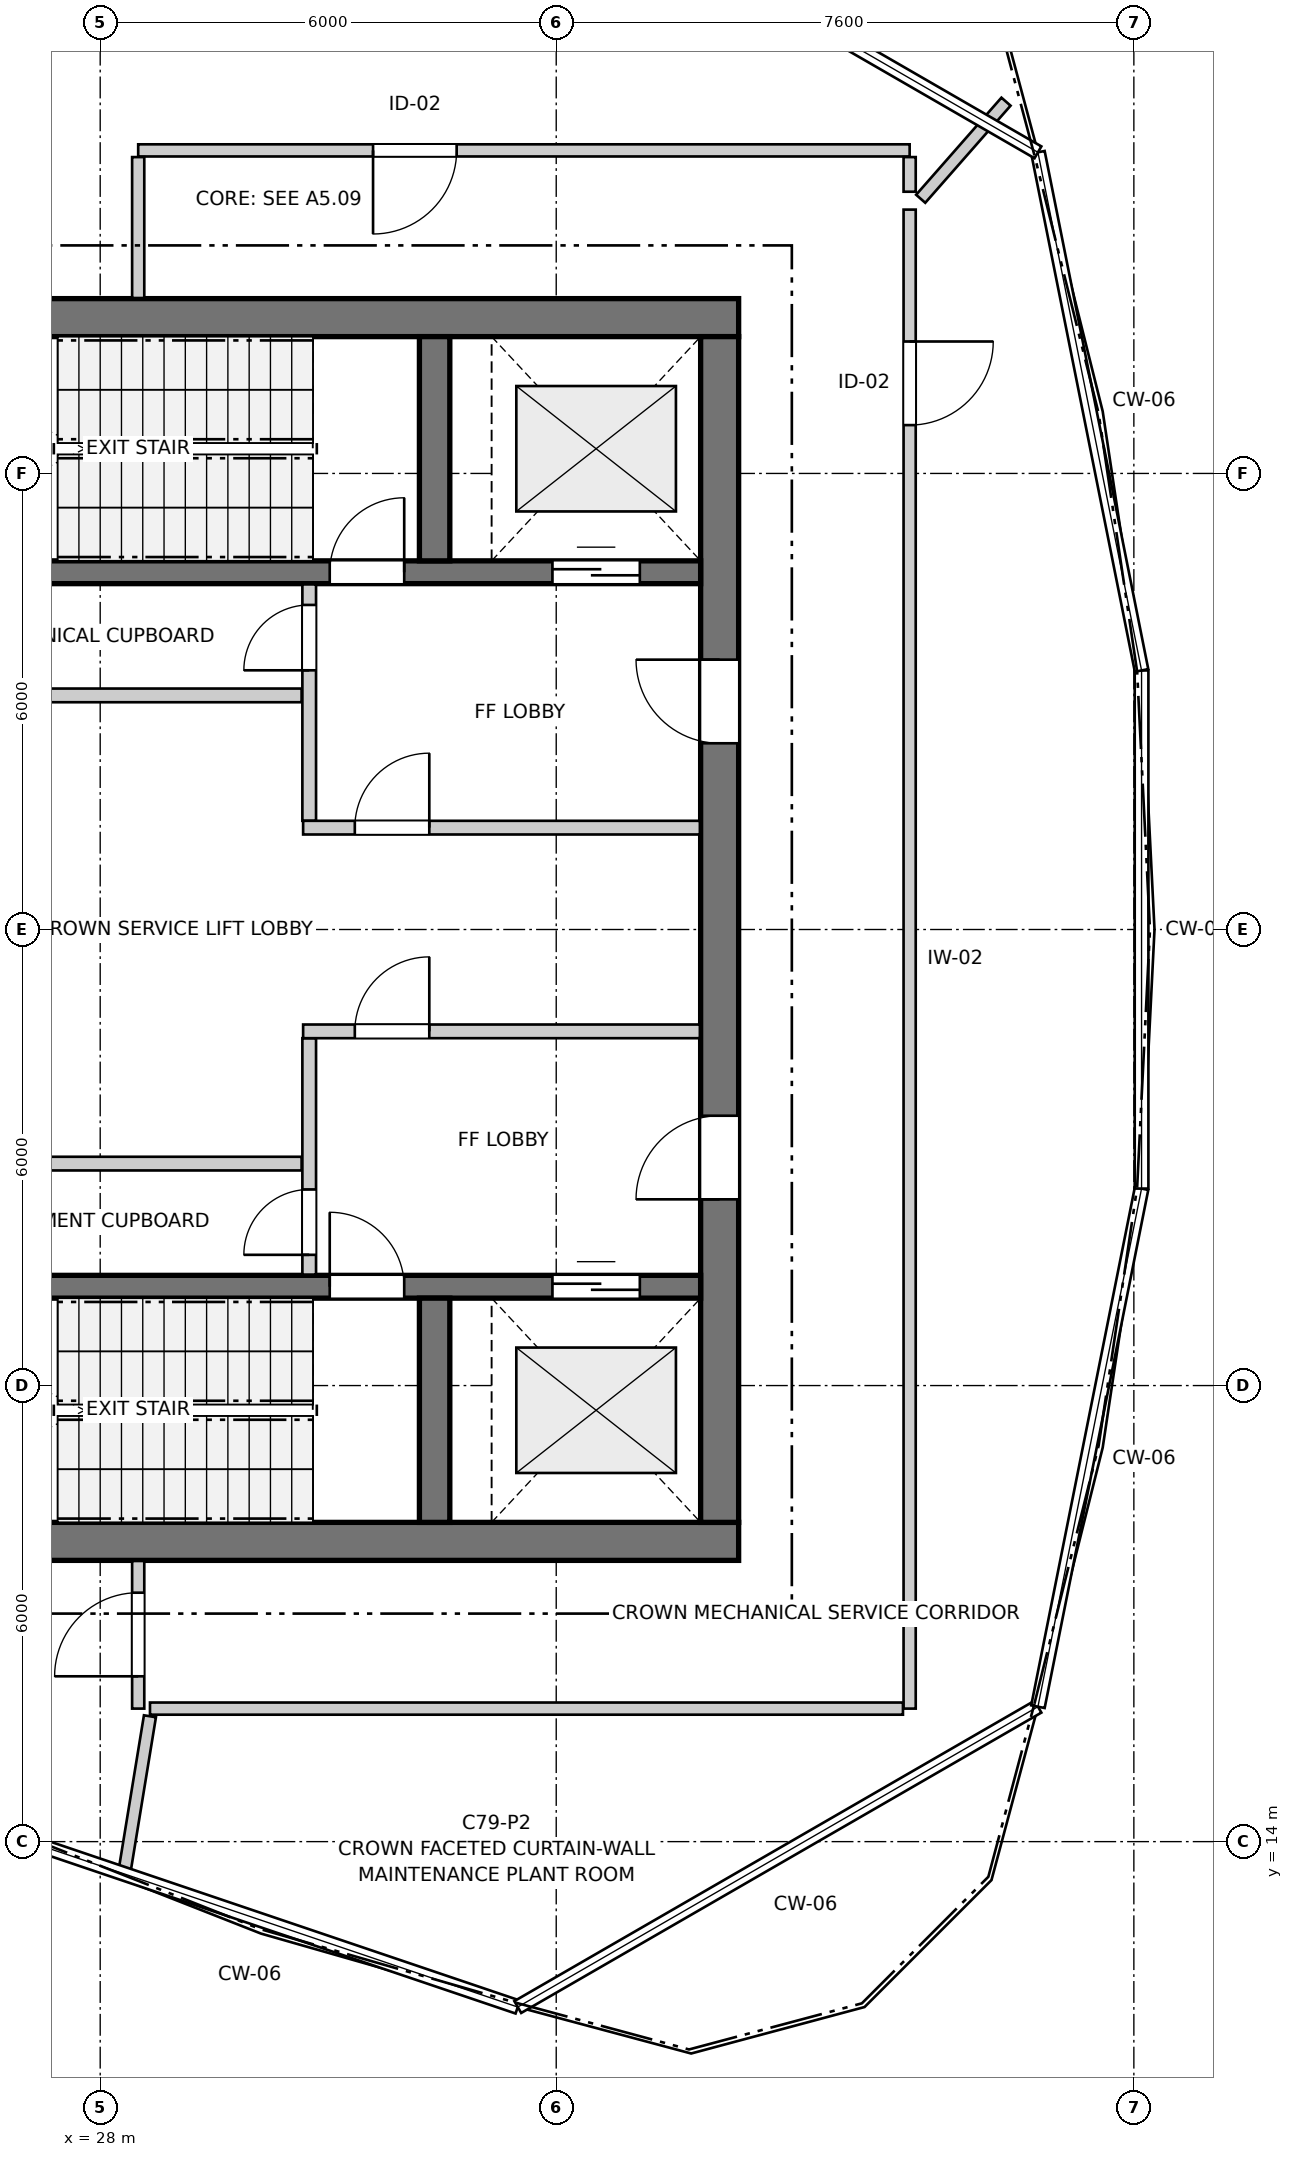
"""IFC4 building model, lengths in metres.
Left out: names, types, materials, properties, quantities, classifications, styles, units other than length and angle.
Written with IfcOpenShell. Run it as: python <this file> out.ifc"""

import sys

from ifc_helpers import new_model, si_unit, direction, frame, frame_2d, origin, place, context, subcontext, project, spatial, rectangle, extrude, source, transform, mapped, element, fill, save


model = new_model("IFC4")
c1 = context("Model", 3, precision=1e-05, world=origin(), true_north=direction((0.0, 1.0)))
c2 = subcontext(c1, "Body", "Model", "MODEL_VIEW")
j1 = project(units=[si_unit("LENGTHUNIT", "METRE"), si_unit("PLANEANGLEUNIT", "RADIAN")], contexts=[c1])
p1 = place(None, origin())
s1 = spatial("IfcSite", under=j1, at=p1, CompositionType="ELEMENT")
p2 = place(p1, origin())
s2 = spatial("IfcBuilding", under=s1, at=p2, CompositionType="ELEMENT")
p3 = place(p2, frame((0.0, 0.0, 266.1)))
s3 = spatial("IfcBuildingStorey", under=s2, at=p3, CompositionType="ELEMENT", Elevation=266.1)
for number, where, z_axis, x_axis in (
    (1, (24.3, 17.95, 0.0), (0.0, 0.0, 1.0), (1.0, 0.0, 0.0)),
    (2, (36.4, 34.05, 0.0), (0.0, 0.0, 1.0), (-1.0, 0.0, 0.0)),
):
    element("IfcWall", number, at=place(p3, frame(where, z_axis=z_axis, x_axis=x_axis)), inside=s3, PredefinedType="SHEAR", context=c2, shape_type="SweptSolid", body=[
        extrude(rectangle(XDim=12.1, YDim=0.5, at=frame_2d((6.05, 0.0))), origin(), (0.0, 0.0, 1.0), 4.05),
    ])
p4 = place(p3, frame((36.15, 18.2, 0.0), z_axis=(0.0, 0.0, 1.0), x_axis=(0.0, 1.0, 0.0)))
e3 = element("IfcWall", 3, at=p4, inside=s3, PredefinedType="SHEAR", context=c2, shape_type="SweptSolid", body=[
    extrude(rectangle(XDim=15.6, YDim=0.5, at=frame_2d((7.8, 0.0))), origin(), (0.0, 0.0, 1.0), 4.05),
])
p5 = place(p4, frame((4.25, 0.0, 0.0)))
e4 = element("IfcOpeningElement", 4, at=p5, cuts=e3, PredefinedType="OPENING", context=c2, shape_type="SweptSolid", body=[
    extrude(rectangle(XDim=1.1, YDim=2.15, at=frame_2d((0.55, 1.075))), frame((0.0, 0.26, 0.0), z_axis=(0.0, -1.0, 0.0), x_axis=(1.0, 0.0, 0.0)), (0.0, 0.0, 1.0), 0.52),
])
p6 = place(p4, frame((10.25, 0.0, 0.0)))
e5 = element("IfcOpeningElement", 5, at=p6, cuts=e3, PredefinedType="OPENING", context=c2, shape_type="SweptSolid", body=[
    extrude(rectangle(XDim=1.1, YDim=2.15, at=frame_2d((0.55, 1.075))), frame((0.0, 0.26, 0.0), z_axis=(0.0, -1.0, 0.0), x_axis=(1.0, 0.0, 0.0)), (0.0, 0.0, 1.0), 0.52),
])
p7 = place(p3, frame((24.8, 21.3, 0.0), z_axis=(0.0, 0.0, 1.0), x_axis=(1.0, 0.0, 0.0)))
e6 = element("IfcWall", 6, at=p7, inside=s3, PredefinedType="SHEAR", context=c2, shape_type="SweptSolid", body=[
    extrude(rectangle(XDim=11.1, YDim=0.3, at=frame_2d((5.55, 0.0))), origin(), (0.0, 0.0, 1.0), 4.05),
])
p8 = place(p7, frame((6.22, 0.0, 0.0)))
e7 = element("IfcOpeningElement", 7, at=p8, cuts=e6, PredefinedType="OPENING", context=c2, shape_type="SweptSolid", body=[
    extrude(rectangle(XDim=0.98, YDim=2.15, at=frame_2d((0.49, 1.075))), frame((0.0, 0.16, 0.0), z_axis=(0.0, -1.0, 0.0), x_axis=(1.0, 0.0, 0.0)), (0.0, 0.0, 1.0), 0.32),
])
p9 = place(p7, frame((9.15, 0.0, 0.0)))
e8 = element("IfcOpeningElement", 8, at=p9, cuts=e6, PredefinedType="OPENING", context=c2, shape_type="SweptSolid", body=[
    extrude(rectangle(XDim=1.15, YDim=2.15, at=frame_2d((0.575, 1.075))), frame((0.0, 0.16, 0.0), z_axis=(0.0, -1.0, 0.0), x_axis=(1.0, 0.0, 0.0)), (0.0, 0.0, 1.0), 0.32),
])
p10 = place(p3, frame((32.4, 18.2, 0.0), z_axis=(0.0, 0.0, 1.0), x_axis=(0.0, 1.0, 0.0)))
e9 = element("IfcWall", 9, at=p10, inside=s3, PredefinedType="SHEAR", context=c2, shape_type="SweptSolid", body=[
    extrude(rectangle(XDim=2.95, YDim=0.4, at=frame_2d((1.475, 0.0))), origin(), (0.0, 0.0, 1.0), 4.05),
])
p11 = place(p3, frame((24.8, 30.7, 0.0), z_axis=(0.0, 0.0, 1.0), x_axis=(1.0, 0.0, 0.0)))
e10 = element("IfcWall", 10, at=p11, inside=s3, PredefinedType="SHEAR", context=c2, shape_type="SweptSolid", body=[
    extrude(rectangle(XDim=11.1, YDim=0.3, at=frame_2d((5.55, 0.0))), origin(), (0.0, 0.0, 1.0), 4.05),
])
p12 = place(p11, frame((6.22, 0.0, 0.0)))
e11 = element("IfcOpeningElement", 11, at=p12, cuts=e10, PredefinedType="OPENING", context=c2, shape_type="SweptSolid", body=[
    extrude(rectangle(XDim=0.98, YDim=2.15, at=frame_2d((0.49, 1.075))), frame((0.0, 0.16, 0.0), z_axis=(0.0, -1.0, 0.0), x_axis=(1.0, 0.0, 0.0)), (0.0, 0.0, 1.0), 0.32),
])
p13 = place(p11, frame((9.15, 0.0, 0.0)))
e12 = element("IfcOpeningElement", 12, at=p13, cuts=e10, PredefinedType="OPENING", context=c2, shape_type="SweptSolid", body=[
    extrude(rectangle(XDim=1.15, YDim=2.15, at=frame_2d((0.575, 1.075))), frame((0.0, 0.16, 0.0), z_axis=(0.0, -1.0, 0.0), x_axis=(1.0, 0.0, 0.0)), (0.0, 0.0, 1.0), 0.32),
])
p14 = place(p3, frame((32.4, 30.85, 0.0), z_axis=(0.0, 0.0, 1.0), x_axis=(0.0, 1.0, 0.0)))
e13 = element("IfcWall", 13, at=p14, inside=s3, PredefinedType="SHEAR", context=c2, shape_type="SweptSolid", body=[
    extrude(rectangle(XDim=2.95, YDim=0.4, at=frame_2d((1.475, 0.0))), origin(), (0.0, 0.0, 1.0), 4.05),
])
p15 = place(p3, frame((30.75, 21.46, 0.0), z_axis=(0.0, 0.0, 1.0), x_axis=(0.0, 1.0, 0.0)))
e14 = element("IfcWall", 14, at=p15, inside=s3, PredefinedType="PARTITIONING", context=c2, shape_type="SweptSolid", body=[
    extrude(rectangle(XDim=3.11, YDim=0.18, at=frame_2d((1.555, 0.0))), origin(), (0.0, 0.0, 1.0), 4.05),
])
p16 = place(p15, frame((0.26, 0.0, 0.0)))
e15 = element("IfcOpeningElement", 15, at=p16, cuts=e14, PredefinedType="OPENING", context=c2, shape_type="SweptSolid", body=[
    extrude(rectangle(XDim=0.86, YDim=2.05, at=frame_2d((0.43, 1.025))), frame((0.0, 0.1, 0.0), z_axis=(0.0, -1.0, 0.0), x_axis=(1.0, 0.0, 0.0)), (0.0, 0.0, 1.0), 0.2),
])
p17 = place(p3, frame((30.67, 24.66, 0.0), z_axis=(0.0, 0.0, 1.0), x_axis=(1.0, 0.0, 0.0)))
e16 = element("IfcWall", 16, at=p17, inside=s3, PredefinedType="PARTITIONING", context=c2, shape_type="SweptSolid", body=[
    extrude(rectangle(XDim=5.22, YDim=0.18, at=frame_2d((2.61, 0.0))), origin(), (0.0, 0.0, 1.0), 4.05),
])
p18 = place(p17, frame((0.68, 0.0, 0.0)))
e17 = element("IfcOpeningElement", 17, at=p18, cuts=e16, PredefinedType="OPENING", context=c2, shape_type="SweptSolid", body=[
    extrude(rectangle(XDim=0.98, YDim=2.15, at=frame_2d((0.49, 1.075))), frame((0.0, 0.1, 0.0), z_axis=(0.0, -1.0, 0.0), x_axis=(1.0, 0.0, 0.0)), (0.0, 0.0, 1.0), 0.2),
])
p19 = place(p3, frame((30.75, 27.43, 0.0), z_axis=(0.0, 0.0, 1.0), x_axis=(0.0, 1.0, 0.0)))
e18 = element("IfcWall", 18, at=p19, inside=s3, PredefinedType="PARTITIONING", context=c2, shape_type="SweptSolid", body=[
    extrude(rectangle(XDim=3.11, YDim=0.18, at=frame_2d((1.555, 0.0))), origin(), (0.0, 0.0, 1.0), 4.05),
])
p20 = place(p19, frame((1.98, 0.0, 0.0)))
e19 = element("IfcOpeningElement", 19, at=p20, cuts=e18, PredefinedType="OPENING", context=c2, shape_type="SweptSolid", body=[
    extrude(rectangle(XDim=0.86, YDim=2.05, at=frame_2d((0.43, 1.025))), frame((0.0, 0.1, 0.0), z_axis=(0.0, -1.0, 0.0), x_axis=(1.0, 0.0, 0.0)), (0.0, 0.0, 1.0), 0.2),
])
p21 = place(p3, frame((30.67, 27.34, 0.0), z_axis=(0.0, 0.0, 1.0), x_axis=(1.0, 0.0, 0.0)))
e20 = element("IfcWall", 20, at=p21, inside=s3, PredefinedType="PARTITIONING", context=c2, shape_type="SweptSolid", body=[
    extrude(rectangle(XDim=5.22, YDim=0.18, at=frame_2d((2.61, 0.0))), origin(), (0.0, 0.0, 1.0), 4.05),
])
p22 = place(p21, frame((0.68, 0.0, 0.0)))
e21 = element("IfcOpeningElement", 21, at=p22, cuts=e20, PredefinedType="OPENING", context=c2, shape_type="SweptSolid", body=[
    extrude(rectangle(XDim=0.98, YDim=2.15, at=frame_2d((0.49, 1.075))), frame((0.0, 0.1, 0.0), z_axis=(0.0, -1.0, 0.0), x_axis=(1.0, 0.0, 0.0)), (0.0, 0.0, 1.0), 0.2),
])
for number, where, z_axis, x_axis in (
    (22, (24.81, 22.92, 0.0), (0.0, 0.0, 1.0), (1.0, 0.0, 0.0)),
    (23, (24.81, 29.08, 0.0), (0.0, 0.0, 1.0), (1.0, 0.0, 0.0)),
):
    element("IfcWall", number, at=place(p3, frame(where, z_axis=z_axis, x_axis=x_axis)), inside=s3, PredefinedType="PARTITIONING", context=c2, shape_type="SweptSolid", body=[
        extrude(rectangle(XDim=5.84, YDim=0.18, at=frame_2d((2.92, 0.0))), origin(), (0.0, 0.0, 1.0), 4.05),
    ])
p23 = place(p3, frame((38.65, 35.471, 0.0), z_axis=(0.0, 0.0, 1.0), x_axis=(0.0, -1.0, 0.0)))
e24 = element("IfcWall", 24, at=p23, inside=s3, PredefinedType="PARTITIONING", context=c2, shape_type="SweptSolid", body=[
    extrude(rectangle(XDim=19.721, YDim=0.16, at=frame_2d((9.86, 0.0))), origin(), (0.0, 0.0, 1.0), 4.05),
])
p24 = place(p23, frame((1.735, 0.0, 0.0)))
e25 = element("IfcOpeningElement", 25, at=p24, cuts=e24, PredefinedType="OPENING", context=c2, shape_type="SweptSolid", body=[
    extrude(rectangle(XDim=1.1, YDim=2.15, at=frame_2d((0.55, 1.075))), frame((0.0, 0.09, 0.0), z_axis=(0.0, -1.0, 0.0), x_axis=(1.0, 0.0, 0.0)), (0.0, 0.0, 1.0), 0.18),
])
p25 = place(p3, frame((38.65, 36.25, 0.0), z_axis=(0.0, 0.0, 1.0), x_axis=(-1.0, 0.0, 0.0)))
e26 = element("IfcWall", 26, at=p25, inside=s3, PredefinedType="PARTITIONING", context=c2, shape_type="SweptSolid", body=[
    extrude(rectangle(XDim=10.15, YDim=0.16, at=frame_2d((5.075, 0.0))), origin(), (0.0, 0.0, 1.0), 4.05),
])
p26 = place(p25, frame((5.96, 0.0, 0.0)))
e27 = element("IfcOpeningElement", 27, at=p26, cuts=e26, PredefinedType="OPENING", context=c2, shape_type="SweptSolid", body=[
    extrude(rectangle(XDim=1.1, YDim=2.15, at=frame_2d((0.55, 1.075))), frame((0.0, 0.09, 0.0), z_axis=(0.0, -1.0, 0.0), x_axis=(1.0, 0.0, 0.0)), (0.0, 0.0, 1.0), 0.18),
])
p27 = place(p3, frame((28.5, 15.75, 0.0), z_axis=(0.0, 0.0, 1.0), x_axis=(0.0, 1.0, 0.0)))
e28 = element("IfcWall", 28, at=p27, inside=s3, PredefinedType="PARTITIONING", context=c2, shape_type="SweptSolid", body=[
    extrude(rectangle(XDim=1.942, YDim=0.16, at=frame_2d((0.971, 0.0))), origin(), (0.0, 0.0, 1.0), 3.318),
])
p28 = place(p27, frame((0.425, 0.0, 0.0)))
e29 = element("IfcOpeningElement", 29, at=p28, cuts=e28, PredefinedType="OPENING", context=c2, shape_type="SweptSolid", body=[
    extrude(rectangle(XDim=1.1, YDim=2.15, at=frame_2d((0.55, 1.075))), frame((0.0, 0.09, 0.0), z_axis=(0.0, -1.0, 0.0), x_axis=(1.0, 0.0, 0.0)), (0.0, 0.0, 1.0), 0.18),
])
p29 = place(p3, frame((28.655, 15.75, 0.0), z_axis=(0.0, 0.0, 1.0), x_axis=(1.0, 0.0, 0.0)))
e30 = element("IfcWall", 30, at=p29, inside=s3, PredefinedType="PARTITIONING", context=c2, shape_type="SweptSolid", body=[
    extrude(rectangle(XDim=9.907, YDim=0.16, at=frame_2d((4.954, 0.0))), origin(), (0.0, 0.0, 1.0), 4.05),
])
p30 = place(p3, frame((28.319, 13.603, 0.0), z_axis=(0.0, 0.0, 1.0), x_axis=(0.161630316239, 0.986851377297, 0.0)))
e31 = element("IfcWall", 31, at=p30, inside=s3, PredefinedType="PARTITIONING", context=c2, shape_type="SweptSolid", body=[
    extrude(rectangle(XDim=2.074, YDim=0.16, at=frame_2d((1.037, 0.0))), origin(), (0.0, 0.0, 1.0), 4.05),
])
p31 = place(p3, frame((28.5, 34.308, 0.0), z_axis=(0.0, 0.0, 1.0), x_axis=(0.0, 1.0, 0.0)))
e32 = element("IfcWall", 32, at=p31, inside=s3, PredefinedType="PARTITIONING", context=c2, shape_type="SweptSolid", body=[
    extrude(rectangle(XDim=1.854, YDim=0.16, at=frame_2d((0.927, 0.0))), origin(), (0.0, 0.0, 1.0), 3.318),
])
p32 = place(p3, frame((38.795, 35.614, 0.0), z_axis=(0.0, 0.0, 1.0), x_axis=(0.659905949222, 0.751348213667, 0.0)))
e33 = element("IfcWall", 33, at=p32, inside=s3, PredefinedType="PARTITIONING", context=c2, shape_type="SweptSolid", body=[
    extrude(rectangle(XDim=1.701, YDim=0.16, at=frame_2d((0.85, 0.0))), origin(), (0.0, 0.0, 1.0), 4.05),
])
p33 = place(p3, frame((38.65, 35.706, 0.0), z_axis=(0.0, 0.0, 1.0), x_axis=(0.0, 1.0, 0.0)))
e34 = element("IfcWall", 34, at=p33, inside=s3, PredefinedType="PARTITIONING", context=c2, shape_type="SweptSolid", body=[
    extrude(rectangle(XDim=0.456, YDim=0.16, at=frame_2d((0.228, 0.0))), origin(), (0.0, 0.0, 1.0), 4.05),
])
m1 = source(origin(), c2, "Body", "SweptSolid", [
    extrude(rectangle(XDim=0.98, YDim=2.15, at=frame_2d((0.49, 1.075))), frame((0.0, 0.025, 0.0), z_axis=(0.0, -1.0, 0.0), x_axis=(1.0, 0.0, 0.0)), (0.0, 0.0, 1.0), 0.05),
])
p34 = place(p8, origin())
e35 = element("IfcDoor", 35, at=p34, inside=s3, OperationType="SINGLE_SWING_LEFT", PredefinedType="DOOR", context=c2, shape_type="MappedRepresentation", body=[
    mapped(m1, transform((0.0, 0.0, 0.0), x_axis=(1.0, 0.0, 0.0), y_axis=(0.0, 1.0, 0.0), z_axis=(0.0, 0.0, 1.0), scale=1.0)),
])
fill(e7, e35)
m2 = source(origin(), c2, "Body", "SweptSolid", [
    extrude(rectangle(XDim=1.15, YDim=2.15, at=frame_2d((0.575, 1.075))), frame((0.0, 0.025, 0.0), z_axis=(0.0, -1.0, 0.0), x_axis=(1.0, 0.0, 0.0)), (0.0, 0.0, 1.0), 0.05),
])
p35 = place(p9, origin())
e36 = element("IfcDoor", 36, at=p35, inside=s3, OperationType="DOUBLE_DOOR_SLIDING", PredefinedType="DOOR", context=c2, shape_type="MappedRepresentation", body=[
    mapped(m2, transform((0.0, 0.0, 0.0), x_axis=(1.0, 0.0, 0.0), y_axis=(0.0, 1.0, 0.0), z_axis=(0.0, 0.0, 1.0), scale=1.0)),
])
fill(e8, e36)
p36 = place(p12, origin())
e37 = element("IfcDoor", 37, at=p36, inside=s3, OperationType="SINGLE_SWING_RIGHT", PredefinedType="DOOR", context=c2, shape_type="MappedRepresentation", body=[
    mapped(m1, transform((0.0, 0.0, 0.0), x_axis=(1.0, 0.0, 0.0), y_axis=(0.0, 1.0, 0.0), z_axis=(0.0, 0.0, 1.0), scale=1.0)),
])
fill(e11, e37)
p37 = place(p13, origin())
e38 = element("IfcDoor", 38, at=p37, inside=s3, OperationType="DOUBLE_DOOR_SLIDING", PredefinedType="DOOR", context=c2, shape_type="MappedRepresentation", body=[
    mapped(m2, transform((0.0, 0.0, 0.0), x_axis=(1.0, 0.0, 0.0), y_axis=(0.0, 1.0, 0.0), z_axis=(0.0, 0.0, 1.0), scale=1.0)),
])
fill(e12, e38)
m3 = source(origin(), c2, "Body", "SweptSolid", [
    extrude(rectangle(XDim=1.1, YDim=2.15, at=frame_2d((0.55, 1.075))), frame((0.0, 0.025, 0.0), z_axis=(0.0, -1.0, 0.0), x_axis=(1.0, 0.0, 0.0)), (0.0, 0.0, 1.0), 0.05),
])
p38 = place(p5, origin())
e39 = element("IfcDoor", 39, at=p38, inside=s3, OperationType="SINGLE_SWING_LEFT", PredefinedType="DOOR", context=c2, shape_type="MappedRepresentation", body=[
    mapped(m3, transform((0.0, 0.0, 0.0), x_axis=(1.0, 0.0, 0.0), y_axis=(0.0, 1.0, 0.0), z_axis=(0.0, 0.0, 1.0), scale=1.0)),
])
fill(e4, e39)
p39 = place(p6, origin())
e40 = element("IfcDoor", 40, at=p39, inside=s3, OperationType="SINGLE_SWING_RIGHT", PredefinedType="DOOR", context=c2, shape_type="MappedRepresentation", body=[
    mapped(m3, transform((0.0, 0.0, 0.0), x_axis=(1.0, 0.0, 0.0), y_axis=(0.0, 1.0, 0.0), z_axis=(0.0, 0.0, 1.0), scale=1.0)),
])
fill(e5, e40)
m4 = source(origin(), c2, "Body", "SweptSolid", [
    extrude(rectangle(XDim=0.86, YDim=2.05, at=frame_2d((0.43, 1.025))), frame((0.0, 0.025, 0.0), z_axis=(0.0, -1.0, 0.0), x_axis=(1.0, 0.0, 0.0)), (0.0, 0.0, 1.0), 0.05),
])
p40 = place(p16, origin())
e41 = element("IfcDoor", 41, at=p40, inside=s3, OperationType="SINGLE_SWING_LEFT", PredefinedType="DOOR", context=c2, shape_type="MappedRepresentation", body=[
    mapped(m4, transform((0.0, 0.0, 0.0), x_axis=(1.0, 0.0, 0.0), y_axis=(0.0, 1.0, 0.0), z_axis=(0.0, 0.0, 1.0), scale=1.0)),
])
fill(e15, e41)
p41 = place(p18, origin())
e42 = element("IfcDoor", 42, at=p41, inside=s3, OperationType="SINGLE_SWING_RIGHT", PredefinedType="DOOR", context=c2, shape_type="MappedRepresentation", body=[
    mapped(m1, transform((0.0, 0.0, 0.0), x_axis=(1.0, 0.0, 0.0), y_axis=(0.0, 1.0, 0.0), z_axis=(0.0, 0.0, 1.0), scale=1.0)),
])
fill(e17, e42)
p42 = place(p20, origin())
e43 = element("IfcDoor", 43, at=p42, inside=s3, OperationType="SINGLE_SWING_LEFT", PredefinedType="DOOR", context=c2, shape_type="MappedRepresentation", body=[
    mapped(m4, transform((0.0, 0.0, 0.0), x_axis=(1.0, 0.0, 0.0), y_axis=(0.0, 1.0, 0.0), z_axis=(0.0, 0.0, 1.0), scale=1.0)),
])
fill(e19, e43)
p43 = place(p22, origin())
e44 = element("IfcDoor", 44, at=p43, inside=s3, OperationType="SINGLE_SWING_RIGHT", PredefinedType="DOOR", context=c2, shape_type="MappedRepresentation", body=[
    mapped(m1, transform((0.0, 0.0, 0.0), x_axis=(1.0, 0.0, 0.0), y_axis=(0.0, 1.0, 0.0), z_axis=(0.0, 0.0, 1.0), scale=1.0)),
])
fill(e21, e44)
p44 = place(p24, origin())
e45 = element("IfcDoor", 45, at=p44, inside=s3, OperationType="SINGLE_SWING_LEFT", PredefinedType="DOOR", context=c2, shape_type="MappedRepresentation", body=[
    mapped(m3, transform((0.0, 0.0, 0.0), x_axis=(1.0, 0.0, 0.0), y_axis=(0.0, 1.0, 0.0), z_axis=(0.0, 0.0, 1.0), scale=1.0)),
])
fill(e25, e45)
p45 = place(p26, origin())
e46 = element("IfcDoor", 46, at=p45, inside=s3, OperationType="SINGLE_SWING_RIGHT", PredefinedType="DOOR", context=c2, shape_type="MappedRepresentation", body=[
    mapped(m3, transform((0.0, 0.0, 0.0), x_axis=(1.0, 0.0, 0.0), y_axis=(0.0, 1.0, 0.0), z_axis=(0.0, 0.0, 1.0), scale=1.0)),
])
fill(e27, e46)
p46 = place(p28, origin())
e47 = element("IfcDoor", 47, at=p46, inside=s3, OperationType="SINGLE_SWING_LEFT", PredefinedType="DOOR", context=c2, shape_type="MappedRepresentation", body=[
    mapped(m3, transform((0.0, 0.0, 0.0), x_axis=(1.0, 0.0, 0.0), y_axis=(0.0, 1.0, 0.0), z_axis=(0.0, 0.0, 1.0), scale=1.0)),
])
fill(e29, e47)
save(model, sys.argv[1])
